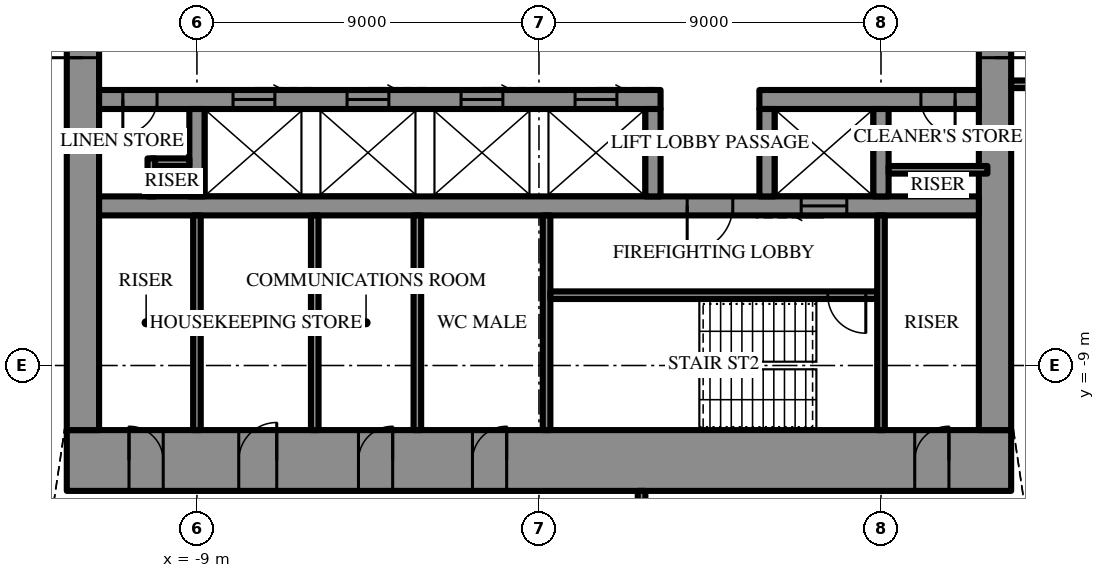
"""IFC4 building model, lengths in metres.
Left out: names, types, materials, properties, quantities, classifications, styles, units other than length and angle.
Written with IfcOpenShell. Run it as: python <this file> out.ifc"""

import sys

from ifc_helpers import new_model, si_unit, direction, frame, frame_2d, origin, place, context, subcontext, project, spatial, rectangle, extrude, element, fill, save


model = new_model("IFC4")
c1 = context("Model", 3, precision=1e-05, world=origin(), true_north=direction((0.0, 1.0)))
c2 = subcontext(c1, "Body", "Model", "MODEL_VIEW")
j1 = project(units=[si_unit("LENGTHUNIT", "METRE"), si_unit("PLANEANGLEUNIT", "RADIAN")], contexts=[c1])
p1 = place(None, origin())
s1 = spatial("IfcSite", under=j1, at=p1, CompositionType="ELEMENT")
p2 = place(p1, origin())
s2 = spatial("IfcBuilding", under=s1, at=p2, CompositionType="ELEMENT")
p3 = place(p2, frame((0.0, 0.0, 382.9)))
s3 = spatial("IfcBuildingStorey", under=s2, at=p3, CompositionType="ELEMENT", Elevation=382.9)
p4 = place(p3, frame((12.425, -11.5, 0.0), z_axis=(0.0, 0.0, 1.0), x_axis=(-1.0, 0.0, 0.0)))
e1 = element("IfcWall", 1, at=p4, inside=s3, PredefinedType="SHEAR", context=c2, shape_type="SweptSolid", body=[
    extrude(rectangle(XDim=24.85, YDim=1.6, at=frame_2d((12.425, 0.0))), origin(), (0.0, 0.0, 1.0), 4.2),
])
p5 = place(p4, frame((13.275, 0.0, 0.0)))
e2 = element("IfcOpeningElement", 2, at=p5, cuts=e1, PredefinedType="OPENING", context=c2, shape_type="SweptSolid", body=[
    extrude(rectangle(XDim=0.9, YDim=2.2, at=frame_2d((0.45, 1.1))), frame((0.0, 0.81, 0.0), z_axis=(0.0, -1.0, 0.0), x_axis=(1.0, 0.0, 0.0)), (0.0, 0.0, 1.0), 1.62),
])
p6 = place(p4, frame((16.275, 0.0, 0.0)))
e3 = element("IfcOpeningElement", 3, at=p6, cuts=e1, PredefinedType="OPENING", context=c2, shape_type="SweptSolid", body=[
    extrude(rectangle(XDim=0.9, YDim=2.2, at=frame_2d((0.45, 1.1))), frame((0.0, 0.81, 0.0), z_axis=(0.0, -1.0, 0.0), x_axis=(1.0, 0.0, 0.0)), (0.0, 0.0, 1.0), 1.62),
])
p7 = place(p4, frame((19.325, 0.0, 0.0)))
e4 = element("IfcOpeningElement", 4, at=p7, cuts=e1, PredefinedType="OPENING", context=c2, shape_type="SweptSolid", body=[
    extrude(rectangle(XDim=1.0, YDim=2.2, at=frame_2d((0.5, 1.1))), frame((0.0, 0.81, 0.0), z_axis=(0.0, -1.0, 0.0), x_axis=(1.0, 0.0, 0.0)), (0.0, 0.0, 1.0), 1.62),
])
p8 = place(p4, frame((1.637, 0.0, 0.0)))
e5 = element("IfcOpeningElement", 5, at=p8, cuts=e1, PredefinedType="OPENING", context=c2, shape_type="SweptSolid", body=[
    extrude(rectangle(XDim=0.9, YDim=2.2, at=frame_2d((0.45, 1.1))), frame((0.0, 0.81, 0.0), z_axis=(0.0, -1.0, 0.0), x_axis=(1.0, 0.0, 0.0)), (0.0, 0.0, 1.0), 1.62),
])
p9 = place(p4, frame((22.312, 0.0, 0.0)))
e6 = element("IfcOpeningElement", 6, at=p9, cuts=e1, PredefinedType="OPENING", context=c2, shape_type="SweptSolid", body=[
    extrude(rectangle(XDim=0.9, YDim=2.2, at=frame_2d((0.45, 1.1))), frame((0.0, 0.81, 0.0), z_axis=(0.0, -1.0, 0.0), x_axis=(1.0, 0.0, 0.0)), (0.0, 0.0, 1.0), 1.62),
])
p10 = place(p3, frame((12.0, -10.7, 0.0), z_axis=(0.0, 0.0, 1.0), x_axis=(0.0, 1.0, 0.0)))
e7 = element("IfcWall", 7, at=p10, inside=s3, PredefinedType="SHEAR", context=c2, shape_type="SweptSolid", body=[
    extrude(rectangle(XDim=21.4, YDim=0.85, at=frame_2d((10.7, 0.0))), origin(), (0.0, 0.0, 1.0), 4.2),
])
p11 = place(p10, frame((9.8, 0.0, 0.0)))
e8 = element("IfcOpeningElement", 8, at=p11, cuts=e7, PredefinedType="OPENING", context=c2, shape_type="SweptSolid", body=[
    extrude(rectangle(XDim=1.8, YDim=2.4, at=frame_2d((0.9, 1.2))), frame((0.0, 0.435, 0.0), z_axis=(0.0, -1.0, 0.0), x_axis=(1.0, 0.0, 0.0)), (0.0, 0.0, 1.0), 0.87),
])
p12 = place(p3, frame((-12.0, 10.7, 0.0), z_axis=(0.0, 0.0, 1.0), x_axis=(0.0, -1.0, 0.0)))
e9 = element("IfcWall", 9, at=p12, inside=s3, PredefinedType="SHEAR", context=c2, shape_type="SweptSolid", body=[
    extrude(rectangle(XDim=21.4, YDim=0.85, at=frame_2d((10.7, 0.0))), origin(), (0.0, 0.0, 1.0), 4.2),
])
p13 = place(p12, frame((9.8, 0.0, 0.0)))
e10 = element("IfcOpeningElement", 10, at=p13, cuts=e9, PredefinedType="OPENING", context=c2, shape_type="SweptSolid", body=[
    extrude(rectangle(XDim=1.8, YDim=2.4, at=frame_2d((0.9, 1.2))), frame((0.0, 0.435, 0.0), z_axis=(0.0, -1.0, 0.0), x_axis=(1.0, 0.0, 0.0)), (0.0, 0.0, 1.0), 0.87),
])
p14 = place(p3, frame((11.575, -2.0, 0.0), z_axis=(0.0, 0.0, 1.0), x_axis=(-1.0, 0.0, 0.0)))
e11 = element("IfcWall", 11, at=p14, inside=s3, PredefinedType="SHEAR", context=c2, shape_type="SweptSolid", body=[
    extrude(rectangle(XDim=5.775, YDim=0.5, at=frame_2d((2.887, 0.0))), origin(), (0.0, 0.0, 1.0), 4.2),
])
p15 = place(p14, frame((0.625, 0.0, 0.0)))
e12 = element("IfcOpeningElement", 12, at=p15, cuts=e11, PredefinedType="OPENING", context=c2, shape_type="SweptSolid", body=[
    extrude(rectangle(XDim=0.9, YDim=2.2, at=frame_2d((0.45, 1.1))), frame((0.0, 0.26, 0.0), z_axis=(0.0, -1.0, 0.0), x_axis=(1.0, 0.0, 0.0)), (0.0, 0.0, 1.0), 0.52),
])
p16 = place(p3, frame((3.2, -2.0, 0.0), z_axis=(0.0, 0.0, 1.0), x_axis=(-1.0, 0.0, 0.0)))
e13 = element("IfcWall", 13, at=p16, inside=s3, PredefinedType="SHEAR", context=c2, shape_type="SweptSolid", body=[
    extrude(rectangle(XDim=14.775, YDim=0.5, at=frame_2d((7.387, 0.0))), origin(), (0.0, 0.0, 1.0), 4.2),
])
p17 = place(p16, frame((13.25, 0.0, 0.0)))
e14 = element("IfcOpeningElement", 14, at=p17, cuts=e13, PredefinedType="OPENING", context=c2, shape_type="SweptSolid", body=[
    extrude(rectangle(XDim=0.9, YDim=2.2, at=frame_2d((0.45, 1.1))), frame((0.0, 0.26, 0.0), z_axis=(0.0, -1.0, 0.0), x_axis=(1.0, 0.0, 0.0)), (0.0, 0.0, 1.0), 0.52),
])
p18 = place(p16, frame((1.15, 0.0, 0.0)))
e15 = element("IfcOpeningElement", 15, at=p18, cuts=e13, PredefinedType="OPENING", context=c2, shape_type="SweptSolid", body=[
    extrude(rectangle(XDim=1.1, YDim=2.2, at=frame_2d((0.55, 1.1))), frame((0.0, 0.26, 0.0), z_axis=(0.0, -1.0, 0.0), x_axis=(1.0, 0.0, 0.0)), (0.0, 0.0, 1.0), 0.52),
])
p19 = place(p16, frame((4.15, 0.0, 0.0)))
e16 = element("IfcOpeningElement", 16, at=p19, cuts=e13, PredefinedType="OPENING", context=c2, shape_type="SweptSolid", body=[
    extrude(rectangle(XDim=1.1, YDim=2.2, at=frame_2d((0.55, 1.1))), frame((0.0, 0.26, 0.0), z_axis=(0.0, -1.0, 0.0), x_axis=(1.0, 0.0, 0.0)), (0.0, 0.0, 1.0), 0.52),
])
p20 = place(p16, frame((7.15, 0.0, 0.0)))
e17 = element("IfcOpeningElement", 17, at=p20, cuts=e13, PredefinedType="OPENING", context=c2, shape_type="SweptSolid", body=[
    extrude(rectangle(XDim=1.1, YDim=2.2, at=frame_2d((0.55, 1.1))), frame((0.0, 0.26, 0.0), z_axis=(0.0, -1.0, 0.0), x_axis=(1.0, 0.0, 0.0)), (0.0, 0.0, 1.0), 0.52),
])
p21 = place(p16, frame((10.15, 0.0, 0.0)))
e18 = element("IfcOpeningElement", 18, at=p21, cuts=e13, PredefinedType="OPENING", context=c2, shape_type="SweptSolid", body=[
    extrude(rectangle(XDim=1.1, YDim=2.2, at=frame_2d((0.55, 1.1))), frame((0.0, 0.26, 0.0), z_axis=(0.0, -1.0, 0.0), x_axis=(1.0, 0.0, 0.0)), (0.0, 0.0, 1.0), 0.52),
])
p22 = place(p3, frame((11.575, -4.8, 0.0), z_axis=(0.0, 0.0, 1.0), x_axis=(-1.0, 0.0, 0.0)))
e19 = element("IfcWall", 19, at=p22, inside=s3, PredefinedType="SHEAR", context=c2, shape_type="SweptSolid", body=[
    extrude(rectangle(XDim=23.15, YDim=0.5, at=frame_2d((11.575, 0.0))), origin(), (0.0, 0.0, 1.0), 4.2),
])
p23 = place(p22, frame((6.475, 0.0, 0.0)))
e20 = element("IfcOpeningElement", 20, at=p23, cuts=e19, PredefinedType="OPENING", context=c2, shape_type="SweptSolid", body=[
    extrude(rectangle(XDim=1.2, YDim=2.2, at=frame_2d((0.6, 1.1))), frame((0.0, 0.26, 0.0), z_axis=(0.0, -1.0, 0.0), x_axis=(1.0, 0.0, 0.0)), (0.0, 0.0, 1.0), 0.52),
])
p24 = place(p22, frame((3.475, 0.0, 0.0)))
e21 = element("IfcOpeningElement", 21, at=p24, cuts=e19, PredefinedType="OPENING", context=c2, shape_type="SweptSolid", body=[
    extrude(rectangle(XDim=1.2, YDim=2.2, at=frame_2d((0.6, 1.1))), frame((0.0, 0.26, 0.0), z_axis=(0.0, -1.0, 0.0), x_axis=(1.0, 0.0, 0.0)), (0.0, 0.0, 1.0), 0.52),
])
for number, where, z_axis, x_axis in (
    (22, (9.0, -2.25, 0.0), (0.0, 0.0, 1.0), (0.0, -1.0, 0.0)),
    (23, (6.0, -2.25, 0.0), (0.0, 0.0, 1.0), (0.0, -1.0, 0.0)),
    (24, (3.0, -2.25, 0.0), (0.0, 0.0, 1.0), (0.0, -1.0, 0.0)),
    (25, (-9.0, -2.25, 0.0), (0.0, 0.0, 1.0), (0.0, -1.0, 0.0)),
):
    element("IfcWall", number, at=place(p3, frame(where, z_axis=z_axis, x_axis=x_axis)), inside=s3, PredefinedType="SHEAR", context=c2, shape_type="SweptSolid", body=[
        extrude(rectangle(XDim=2.3, YDim=0.4, at=frame_2d((1.15, 0.0))), origin(), (0.0, 0.0, 1.0), 4.2),
    ])
p25 = place(p3, frame((0.2, -5.05, 0.0), z_axis=(0.0, 0.0, 1.0), x_axis=(0.0, -1.0, 0.0)))
e26 = element("IfcWall", 26, at=p25, inside=s3, PredefinedType="SHEAR", context=c2, shape_type="SweptSolid", body=[
    extrude(rectangle(XDim=5.65, YDim=0.2, at=frame_2d((2.825, 0.0))), origin(), (0.0, 0.0, 1.0), 4.2),
])
p26 = place(p3, frame((8.9, -7.15, 0.0), z_axis=(0.0, 0.0, 1.0), x_axis=(-1.0, 0.0, 0.0)))
e27 = element("IfcWall", 27, at=p26, inside=s3, PredefinedType="SHEAR", context=c2, shape_type="SweptSolid", body=[
    extrude(rectangle(XDim=8.6, YDim=0.2, at=frame_2d((4.3, 0.0))), origin(), (0.0, 0.0, 1.0), 4.2),
])
p27 = place(p26, frame((0.3, 0.0, 0.0)))
e28 = element("IfcOpeningElement", 28, at=p27, cuts=e27, PredefinedType="OPENING", context=c2, shape_type="SweptSolid", body=[
    extrude(rectangle(XDim=1.0, YDim=2.2, at=frame_2d((0.5, 1.1))), frame((0.0, 0.11, 0.0), z_axis=(0.0, -1.0, 0.0), x_axis=(1.0, 0.0, 0.0)), (0.0, 0.0, 1.0), 0.22),
])
for number, where, z_axis, x_axis in (
    (29, (9.0, -5.05, 0.0), (0.0, 0.0, 1.0), (0.0, -1.0, 0.0)),
    (30, (-9.0, -5.05, 0.0), (0.0, 0.0, 1.0), (0.0, -1.0, 0.0)),
    (31, (-3.2, -5.05, 0.0), (0.0, 0.0, 1.0), (0.0, -1.0, 0.0)),
    (32, (-5.9, -5.05, 0.0), (0.0, 0.0, 1.0), (0.0, -1.0, 0.0)),
):
    element("IfcWall", number, at=place(p3, frame(where, z_axis=z_axis, x_axis=x_axis)), inside=s3, PredefinedType="PARTITIONING", context=c2, shape_type="SweptSolid", body=[
        extrude(rectangle(XDim=5.65, YDim=0.2, at=frame_2d((2.825, 0.0))), origin(), (0.0, 0.0, 1.0), 4.0),
    ])
p28 = place(p3, frame((11.8, -3.85, 0.0), z_axis=(0.0, 0.0, 1.0), x_axis=(-1.0, 0.0, 0.0)))
e33 = element("IfcWall", 33, at=p28, inside=s3, PredefinedType="PARTITIONING", context=c2, shape_type="SweptSolid", body=[
    extrude(rectangle(XDim=2.6, YDim=0.2, at=frame_2d((1.3, 0.0))), origin(), (0.0, 0.0, 1.0), 4.0),
])
for number, where, z_axis, x_axis in (
    (34, (-9.2, -3.65, 0.0), (0.0, 0.0, 1.0), (-1.0, 0.0, 0.0)),
    (35, (-10.2, -3.55, 0.0), (0.0, 0.0, 1.0), (0.0, -1.0, 0.0)),
):
    element("IfcWall", number, at=place(p3, frame(where, z_axis=z_axis, x_axis=x_axis)), inside=s3, PredefinedType="PARTITIONING", context=c2, shape_type="SweptSolid", body=[
        extrude(rectangle(XDim=1.0, YDim=0.2, at=frame_2d((0.5, 0.0))), origin(), (0.0, 0.0, 1.0), 4.0),
    ])
p29 = place(p3, frame((2.7, -12.3, 0.0), z_axis=(0.0, 0.0, 1.0), x_axis=(0.0, -1.0, 0.0)))
e36 = element("IfcWall", 36, at=p29, inside=s3, PredefinedType="PARTITIONING", context=c2, shape_type="SweptSolid", body=[
    extrude(rectangle(XDim=1.7, YDim=0.2, at=frame_2d((0.85, 0.0))), origin(), (0.0, 0.0, 1.0), 4.0),
])
p30 = place(p29, frame((0.35, 0.0, 0.0)))
e37 = element("IfcOpeningElement", 37, at=p30, cuts=e36, PredefinedType="OPENING", context=c2, shape_type="SweptSolid", body=[
    extrude(rectangle(XDim=1.0, YDim=2.2, at=frame_2d((0.5, 1.1))), frame((0.0, 0.11, 0.0), z_axis=(0.0, -1.0, 0.0), x_axis=(1.0, 0.0, 0.0)), (0.0, 0.0, 1.0), 0.22),
])
p31 = place(p3, frame((12.425, -1.6, 0.0), z_axis=(0.0, 0.0, 1.0), x_axis=(1.0, 0.0, 0.0)))
e38 = element("IfcWall", 38, at=p31, inside=s3, PredefinedType="PARTITIONING", context=c2, shape_type="SweptSolid", body=[
    extrude(rectangle(XDim=16.558, YDim=0.2, at=frame_2d((8.279, 0.0))), origin(), (0.0, 0.0, 1.0), 4.0),
])
p32 = place(p31, frame((1.156, 0.0, 0.0)))
e39 = element("IfcOpeningElement", 39, at=p32, cuts=e38, PredefinedType="OPENING", context=c2, shape_type="SweptSolid", body=[
    extrude(rectangle(XDim=1.0, YDim=2.2, at=frame_2d((0.5, 1.1))), frame((0.0, 0.11, 0.0), z_axis=(0.0, -1.0, 0.0), x_axis=(1.0, 0.0, 0.0)), (0.0, 0.0, 1.0), 0.22),
])
p33 = place(p11, frame((1.8, 0.0, 0.0), z_axis=(0.0, 0.0, 1.0), x_axis=(-1.0, 0.0, 0.0)))
e40 = element("IfcDoor", 40, at=p33, inside=s3, OperationType="DOUBLE_DOOR_SINGLE_SWING", PredefinedType="DOOR", context=c2, shape_type="SweptSolid", body=[
    extrude(rectangle(XDim=1.8, YDim=2.4, at=frame_2d((0.9, 1.2))), frame((0.0, 0.025, 0.0), z_axis=(0.0, -1.0, 0.0), x_axis=(1.0, 0.0, 0.0)), (0.0, 0.0, 1.0), 0.05),
])
fill(e8, e40)
p34 = place(p13, frame((1.8, 0.0, 0.0), z_axis=(0.0, 0.0, 1.0), x_axis=(-1.0, 0.0, 0.0)))
e41 = element("IfcDoor", 41, at=p34, inside=s3, OperationType="DOUBLE_DOOR_SINGLE_SWING", PredefinedType="DOOR", context=c2, shape_type="SweptSolid", body=[
    extrude(rectangle(XDim=1.8, YDim=2.4, at=frame_2d((0.9, 1.2))), frame((0.0, 0.025, 0.0), z_axis=(0.0, -1.0, 0.0), x_axis=(1.0, 0.0, 0.0)), (0.0, 0.0, 1.0), 0.05),
])
fill(e10, e41)
p35 = place(p23, origin())
e42 = element("IfcDoor", 42, at=p35, inside=s3, OperationType="SINGLE_SWING_LEFT", PredefinedType="DOOR", context=c2, shape_type="SweptSolid", body=[
    extrude(rectangle(XDim=1.2, YDim=2.2, at=frame_2d((0.6, 1.1))), frame((0.0, 0.025, 0.0), z_axis=(0.0, -1.0, 0.0), x_axis=(1.0, 0.0, 0.0)), (0.0, 0.0, 1.0), 0.05),
])
fill(e20, e42)
p36 = place(p27, origin())
e43 = element("IfcDoor", 43, at=p36, inside=s3, OperationType="SINGLE_SWING_RIGHT", PredefinedType="DOOR", context=c2, shape_type="SweptSolid", body=[
    extrude(rectangle(XDim=1.0, YDim=2.2, at=frame_2d((0.5, 1.1))), frame((0.0, 0.025, 0.0), z_axis=(0.0, -1.0, 0.0), x_axis=(1.0, 0.0, 0.0)), (0.0, 0.0, 1.0), 0.05),
])
fill(e28, e43)
p37 = place(p5, frame((0.9, 0.0, 0.0), z_axis=(0.0, 0.0, 1.0), x_axis=(-1.0, 0.0, 0.0)))
e44 = element("IfcDoor", 44, at=p37, inside=s3, OperationType="SINGLE_SWING_LEFT", PredefinedType="DOOR", context=c2, shape_type="SweptSolid", body=[
    extrude(rectangle(XDim=0.9, YDim=2.2, at=frame_2d((0.45, 1.1))), frame((0.0, 0.025, 0.0), z_axis=(0.0, -1.0, 0.0), x_axis=(1.0, 0.0, 0.0)), (0.0, 0.0, 1.0), 0.05),
])
fill(e2, e44)
p38 = place(p6, frame((0.9, 0.0, 0.0), z_axis=(0.0, 0.0, 1.0), x_axis=(-1.0, 0.0, 0.0)))
e45 = element("IfcDoor", 45, at=p38, inside=s3, OperationType="SINGLE_SWING_LEFT", PredefinedType="DOOR", context=c2, shape_type="SweptSolid", body=[
    extrude(rectangle(XDim=0.9, YDim=2.2, at=frame_2d((0.45, 1.1))), frame((0.0, 0.025, 0.0), z_axis=(0.0, -1.0, 0.0), x_axis=(1.0, 0.0, 0.0)), (0.0, 0.0, 1.0), 0.05),
])
fill(e3, e45)
p39 = place(p7, frame((1.0, 0.0, 0.0), z_axis=(0.0, 0.0, 1.0), x_axis=(-1.0, 0.0, 0.0)))
e46 = element("IfcDoor", 46, at=p39, inside=s3, OperationType="SINGLE_SWING_LEFT", PredefinedType="DOOR", context=c2, shape_type="SweptSolid", body=[
    extrude(rectangle(XDim=1.0, YDim=2.2, at=frame_2d((0.5, 1.1))), frame((0.0, 0.025, 0.0), z_axis=(0.0, -1.0, 0.0), x_axis=(1.0, 0.0, 0.0)), (0.0, 0.0, 1.0), 0.05),
])
fill(e4, e46)
p40 = place(p8, frame((0.9, 0.0, 0.0), z_axis=(0.0, 0.0, 1.0), x_axis=(-1.0, 0.0, 0.0)))
e47 = element("IfcDoor", 47, at=p40, inside=s3, OperationType="SINGLE_SWING_LEFT", PredefinedType="DOOR", context=c2, shape_type="SweptSolid", body=[
    extrude(rectangle(XDim=0.9, YDim=2.2, at=frame_2d((0.45, 1.1))), frame((0.0, 0.025, 0.0), z_axis=(0.0, -1.0, 0.0), x_axis=(1.0, 0.0, 0.0)), (0.0, 0.0, 1.0), 0.05),
])
fill(e5, e47)
p41 = place(p9, frame((0.9, 0.0, 0.0), z_axis=(0.0, 0.0, 1.0), x_axis=(-1.0, 0.0, 0.0)))
e48 = element("IfcDoor", 48, at=p41, inside=s3, OperationType="SINGLE_SWING_RIGHT", PredefinedType="DOOR", context=c2, shape_type="SweptSolid", body=[
    extrude(rectangle(XDim=0.9, YDim=2.2, at=frame_2d((0.45, 1.1))), frame((0.0, 0.025, 0.0), z_axis=(0.0, -1.0, 0.0), x_axis=(1.0, 0.0, 0.0)), (0.0, 0.0, 1.0), 0.05),
])
fill(e6, e48)
p42 = place(p15, origin())
e49 = element("IfcDoor", 49, at=p42, inside=s3, OperationType="SINGLE_SWING_RIGHT", PredefinedType="DOOR", context=c2, shape_type="SweptSolid", body=[
    extrude(rectangle(XDim=0.9, YDim=2.2, at=frame_2d((0.45, 1.1))), frame((0.0, 0.025, 0.0), z_axis=(0.0, -1.0, 0.0), x_axis=(1.0, 0.0, 0.0)), (0.0, 0.0, 1.0), 0.05),
])
fill(e12, e49)
p43 = place(p17, origin())
e50 = element("IfcDoor", 50, at=p43, inside=s3, OperationType="SINGLE_SWING_LEFT", PredefinedType="DOOR", context=c2, shape_type="SweptSolid", body=[
    extrude(rectangle(XDim=0.9, YDim=2.2, at=frame_2d((0.45, 1.1))), frame((0.0, 0.025, 0.0), z_axis=(0.0, -1.0, 0.0), x_axis=(1.0, 0.0, 0.0)), (0.0, 0.0, 1.0), 0.05),
])
fill(e14, e50)
p44 = place(p24, origin())
e51 = element("IfcDoor", 51, at=p44, inside=s3, OperationType="SLIDING_TO_LEFT", PredefinedType="DOOR", context=c2, shape_type="SweptSolid", body=[
    extrude(rectangle(XDim=1.2, YDim=2.2, at=frame_2d((0.6, 1.1))), frame((0.0, 0.025, 0.0), z_axis=(0.0, -1.0, 0.0), x_axis=(1.0, 0.0, 0.0)), (0.0, 0.0, 1.0), 0.05),
])
fill(e21, e51)
p45 = place(p18, frame((1.1, 0.0, 0.0), z_axis=(0.0, 0.0, 1.0), x_axis=(-1.0, 0.0, 0.0)))
e52 = element("IfcDoor", 52, at=p45, inside=s3, OperationType="SLIDING_TO_LEFT", PredefinedType="DOOR", context=c2, shape_type="SweptSolid", body=[
    extrude(rectangle(XDim=1.1, YDim=2.2, at=frame_2d((0.55, 1.1))), frame((0.0, 0.025, 0.0), z_axis=(0.0, -1.0, 0.0), x_axis=(1.0, 0.0, 0.0)), (0.0, 0.0, 1.0), 0.05),
])
fill(e15, e52)
p46 = place(p19, frame((1.1, 0.0, 0.0), z_axis=(0.0, 0.0, 1.0), x_axis=(-1.0, 0.0, 0.0)))
e53 = element("IfcDoor", 53, at=p46, inside=s3, OperationType="SLIDING_TO_LEFT", PredefinedType="DOOR", context=c2, shape_type="SweptSolid", body=[
    extrude(rectangle(XDim=1.1, YDim=2.2, at=frame_2d((0.55, 1.1))), frame((0.0, 0.025, 0.0), z_axis=(0.0, -1.0, 0.0), x_axis=(1.0, 0.0, 0.0)), (0.0, 0.0, 1.0), 0.05),
])
fill(e16, e53)
p47 = place(p20, frame((1.1, 0.0, 0.0), z_axis=(0.0, 0.0, 1.0), x_axis=(-1.0, 0.0, 0.0)))
e54 = element("IfcDoor", 54, at=p47, inside=s3, OperationType="SLIDING_TO_LEFT", PredefinedType="DOOR", context=c2, shape_type="SweptSolid", body=[
    extrude(rectangle(XDim=1.1, YDim=2.2, at=frame_2d((0.55, 1.1))), frame((0.0, 0.025, 0.0), z_axis=(0.0, -1.0, 0.0), x_axis=(1.0, 0.0, 0.0)), (0.0, 0.0, 1.0), 0.05),
])
fill(e17, e54)
p48 = place(p21, frame((1.1, 0.0, 0.0), z_axis=(0.0, 0.0, 1.0), x_axis=(-1.0, 0.0, 0.0)))
e55 = element("IfcDoor", 55, at=p48, inside=s3, OperationType="SLIDING_TO_LEFT", PredefinedType="DOOR", context=c2, shape_type="SweptSolid", body=[
    extrude(rectangle(XDim=1.1, YDim=2.2, at=frame_2d((0.55, 1.1))), frame((0.0, 0.025, 0.0), z_axis=(0.0, -1.0, 0.0), x_axis=(1.0, 0.0, 0.0)), (0.0, 0.0, 1.0), 0.05),
])
fill(e18, e55)
save(model, sys.argv[1])
